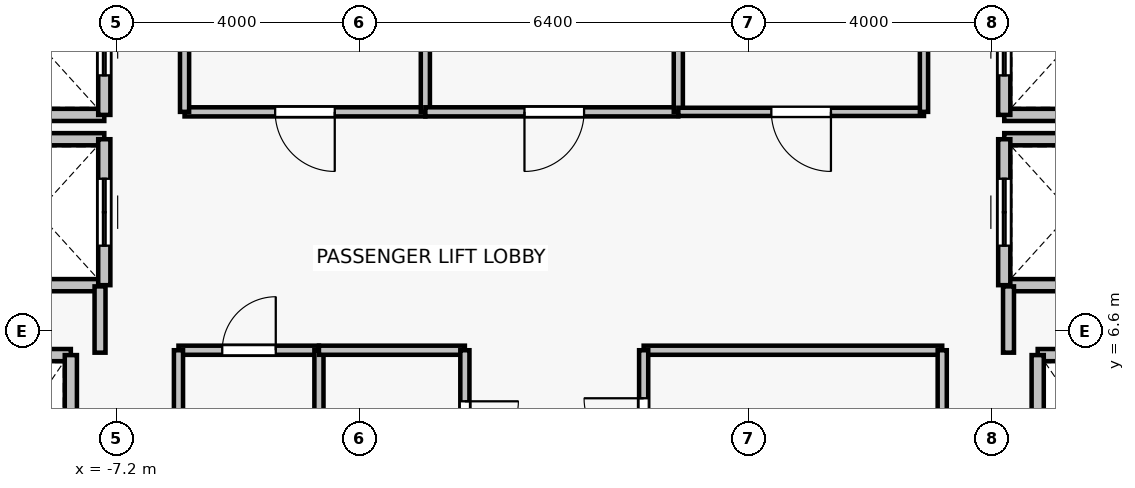
"""IFC4 building model, lengths in metres.
Left out: names, types, materials, properties, quantities, classifications, styles, units other than length and angle.
Written with IfcOpenShell. Run it as: python <this file> out.ifc"""

import sys

from ifc_helpers import new_model, si_unit, direction, frame, frame_2d, origin, place, context, subcontext, project, spatial, rectangle, extrude, source, transform, mapped, element, fill, save


model = new_model("IFC4")
c1 = context("Model", 3, precision=1e-05, world=origin(), true_north=direction((0.0, 1.0)))
c2 = subcontext(c1, "Body", "Model", "MODEL_VIEW")
j1 = project(units=[si_unit("LENGTHUNIT", "METRE"), si_unit("PLANEANGLEUNIT", "RADIAN")], contexts=[c1])
p1 = place(None, origin())
s1 = spatial("IfcSite", under=j1, at=p1, CompositionType="ELEMENT")
p2 = place(p1, origin())
s2 = spatial("IfcBuilding", under=s1, at=p2, CompositionType="ELEMENT")
p3 = place(p2, frame((0.0, 0.0, 222.1)))
s3 = spatial("IfcBuildingStorey", under=s2, at=p3, CompositionType="ELEMENT", Elevation=222.1)
p4 = place(p3, frame((-9.95, 6.2, 0.0), z_axis=(0.0, 0.0, 1.0), x_axis=(1.0, 0.0, 0.0)))
e1 = element("IfcWall", 1, at=p4, inside=s3, PredefinedType="SOLIDWALL", context=c2, shape_type="SweptSolid", body=[
    extrude(rectangle(XDim=2.0, YDim=0.2, at=frame_2d((1.0, 0.0))), origin(), (0.0, 0.0, 1.0), 3.075),
])
p5 = place(p3, frame((-7.95, 6.2, 0.0), z_axis=(0.0, 0.0, 1.0), x_axis=(0.0, -1.0, 0.0)))
e2 = element("IfcWall", 2, at=p5, inside=s3, PredefinedType="SOLIDWALL", context=c2, shape_type="SweptSolid", body=[
    extrude(rectangle(XDim=2.8, YDim=0.2, at=frame_2d((1.4, 0.0))), origin(), (0.0, 0.0, 1.0), 3.075),
])
p6 = place(p3, frame((7.95, 6.2, 0.0), z_axis=(0.0, 0.0, 1.0), x_axis=(1.0, 0.0, 0.0)))
e3 = element("IfcWall", 3, at=p6, inside=s3, PredefinedType="SOLIDWALL", context=c2, shape_type="SweptSolid", body=[
    extrude(rectangle(XDim=2.0, YDim=0.2, at=frame_2d((1.0, 0.0))), origin(), (0.0, 0.0, 1.0), 3.075),
])
p7 = place(p3, frame((7.95, 3.4, 0.0), z_axis=(0.0, 0.0, 1.0), x_axis=(0.0, 1.0, 0.0)))
e4 = element("IfcWall", 4, at=p7, inside=s3, PredefinedType="SOLIDWALL", context=c2, shape_type="SweptSolid", body=[
    extrude(rectangle(XDim=2.8, YDim=0.2, at=frame_2d((1.4, 0.0))), origin(), (0.0, 0.0, 1.0), 3.075),
])
for number, where, z_axis, x_axis in (
    (5, (-7.4, 7.35, 0.0), (0.0, 0.0, 1.0), (-1.0, 0.0, 0.0)),
    (6, (-9.6, 9.75, 0.0), (0.0, 0.0, 1.0), (1.0, 0.0, 0.0)),
):
    element("IfcWall", number, at=place(p3, frame(where, z_axis=z_axis, x_axis=x_axis)), inside=s3, PredefinedType="SOLIDWALL", context=c2, shape_type="SweptSolid", body=[
        extrude(rectangle(XDim=2.2, YDim=0.2, at=frame_2d((1.1, 0.0))), origin(), (0.0, 0.0, 1.0), 2.615),
    ])
p8 = place(p3, frame((-7.4, 9.75, 0.0), z_axis=(0.0, 0.0, 1.0), x_axis=(0.0, -1.0, 0.0)))
e7 = element("IfcWall", 7, at=p8, inside=s3, PredefinedType="SOLIDWALL", context=c2, shape_type="SweptSolid", body=[
    extrude(rectangle(XDim=2.4, YDim=0.2, at=frame_2d((1.2, 0.0))), origin(), (0.0, 0.0, 1.0), 2.615),
])
p9 = place(p8, frame((0.65, 0.0, 0.0)))
e8 = element("IfcOpeningElement", 8, at=p9, cuts=e7, PredefinedType="OPENING", context=c2, shape_type="SweptSolid", body=[
    extrude(rectangle(XDim=1.1, YDim=2.2, at=frame_2d((0.55, 1.1))), frame((0.0, 0.11, 0.0), z_axis=(0.0, -1.0, 0.0), x_axis=(1.0, 0.0, 0.0)), (0.0, 0.0, 1.0), 0.22),
])
p10 = place(p3, frame((-7.4, 10.15, 0.0), z_axis=(0.0, 0.0, 1.0), x_axis=(-1.0, 0.0, 0.0)))
e9 = element("IfcWall", 9, at=p10, inside=s3, PredefinedType="SOLIDWALL", context=c2, shape_type="SweptSolid", body=[
    extrude(rectangle(XDim=2.2, YDim=0.2, at=frame_2d((1.1, 0.0))), origin(), (0.0, 0.0, 1.0), 2.615),
])
p11 = place(p3, frame((-7.4, 12.55, 0.0), z_axis=(0.0, 0.0, 1.0), x_axis=(0.0, -1.0, 0.0)))
e10 = element("IfcWall", 10, at=p11, inside=s3, PredefinedType="SOLIDWALL", context=c2, shape_type="SweptSolid", body=[
    extrude(rectangle(XDim=2.4, YDim=0.2, at=frame_2d((1.2, 0.0))), origin(), (0.0, 0.0, 1.0), 2.615),
])
p12 = place(p11, frame((0.65, 0.0, 0.0)))
e11 = element("IfcOpeningElement", 11, at=p12, cuts=e10, PredefinedType="OPENING", context=c2, shape_type="SweptSolid", body=[
    extrude(rectangle(XDim=1.1, YDim=2.2, at=frame_2d((0.55, 1.1))), frame((0.0, 0.11, 0.0), z_axis=(0.0, -1.0, 0.0), x_axis=(1.0, 0.0, 0.0)), (0.0, 0.0, 1.0), 0.22),
])
for number, where, z_axis, x_axis in (
    (12, (9.6, 7.35, 0.0), (0.0, 0.0, 1.0), (-1.0, 0.0, 0.0)),
    (13, (7.4, 9.75, 0.0), (0.0, 0.0, 1.0), (1.0, 0.0, 0.0)),
):
    element("IfcWall", number, at=place(p3, frame(where, z_axis=z_axis, x_axis=x_axis)), inside=s3, PredefinedType="SOLIDWALL", context=c2, shape_type="SweptSolid", body=[
        extrude(rectangle(XDim=2.2, YDim=0.2, at=frame_2d((1.1, 0.0))), origin(), (0.0, 0.0, 1.0), 2.615),
    ])
p13 = place(p3, frame((7.4, 7.35, 0.0), z_axis=(0.0, 0.0, 1.0), x_axis=(0.0, 1.0, 0.0)))
e14 = element("IfcWall", 14, at=p13, inside=s3, PredefinedType="SOLIDWALL", context=c2, shape_type="SweptSolid", body=[
    extrude(rectangle(XDim=2.4, YDim=0.2, at=frame_2d((1.2, 0.0))), origin(), (0.0, 0.0, 1.0), 2.615),
])
p14 = place(p13, frame((0.65, 0.0, 0.0)))
e15 = element("IfcOpeningElement", 15, at=p14, cuts=e14, PredefinedType="OPENING", context=c2, shape_type="SweptSolid", body=[
    extrude(rectangle(XDim=1.1, YDim=2.2, at=frame_2d((0.55, 1.1))), frame((0.0, 0.11, 0.0), z_axis=(0.0, -1.0, 0.0), x_axis=(1.0, 0.0, 0.0)), (0.0, 0.0, 1.0), 0.22),
])
p15 = place(p3, frame((9.6, 10.15, 0.0), z_axis=(0.0, 0.0, 1.0), x_axis=(-1.0, 0.0, 0.0)))
e16 = element("IfcWall", 16, at=p15, inside=s3, PredefinedType="SOLIDWALL", context=c2, shape_type="SweptSolid", body=[
    extrude(rectangle(XDim=2.2, YDim=0.2, at=frame_2d((1.1, 0.0))), origin(), (0.0, 0.0, 1.0), 2.615),
])
p16 = place(p3, frame((7.4, 10.15, 0.0), z_axis=(0.0, 0.0, 1.0), x_axis=(0.0, 1.0, 0.0)))
e17 = element("IfcWall", 17, at=p16, inside=s3, PredefinedType="SOLIDWALL", context=c2, shape_type="SweptSolid", body=[
    extrude(rectangle(XDim=2.4, YDim=0.2, at=frame_2d((1.2, 0.0))), origin(), (0.0, 0.0, 1.0), 2.615),
])
p17 = place(p16, frame((0.65, 0.0, 0.0)))
e18 = element("IfcOpeningElement", 18, at=p17, cuts=e17, PredefinedType="OPENING", context=c2, shape_type="SweptSolid", body=[
    extrude(rectangle(XDim=1.1, YDim=2.2, at=frame_2d((0.55, 1.1))), frame((0.0, 0.11, 0.0), z_axis=(0.0, -1.0, 0.0), x_axis=(1.0, 0.0, 0.0)), (0.0, 0.0, 1.0), 0.22),
])
for number, where, z_axis, x_axis in (
    (19, (-7.47, 7.33, 0.0), (0.0, 0.0, 1.0), (0.0, -1.0, 0.0)),
    (20, (7.47, 6.24, 0.0), (0.0, 0.0, 1.0), (0.0, 1.0, 0.0)),
):
    element("IfcWall", number, at=place(p3, frame(where, z_axis=z_axis, x_axis=x_axis)), inside=s3, PredefinedType="PARTITIONING", context=c2, shape_type="SweptSolid", body=[
        extrude(rectangle(XDim=1.09, YDim=0.18, at=frame_2d((0.545, 0.0))), origin(), (0.0, 0.0, 1.0), 2.615),
    ])
p18 = place(p3, frame((-2.12, 10.2, 0.0), z_axis=(0.0, 0.0, 1.0), x_axis=(-1.0, 0.0, 0.0)))
e21 = element("IfcWall", 21, at=p18, inside=s3, PredefinedType="PARTITIONING", context=c2, shape_type="SweptSolid", body=[
    extrude(rectangle(XDim=3.96, YDim=0.15, at=frame_2d((1.98, 0.0))), origin(), (0.0, 0.0, 1.0), 3.075),
])
p19 = place(p18, frame((1.49, 0.0, 0.0)))
e22 = element("IfcOpeningElement", 22, at=p19, cuts=e21, PredefinedType="OPENING", context=c2, shape_type="SweptSolid", body=[
    extrude(rectangle(XDim=0.98, YDim=2.15, at=frame_2d((0.49, 1.075))), frame((0.0, 0.085, 0.0), z_axis=(0.0, -1.0, 0.0), x_axis=(1.0, 0.0, 0.0)), (0.0, 0.0, 1.0), 0.17),
])
for number, where, z_axis, x_axis in (
    (23, (-6.08, 10.2, 0.0), (0.0, 0.0, 1.0), (0.0, 1.0, 0.0)),
    (24, (-2.12, 13.0, 0.0), (0.0, 0.0, 1.0), (0.0, -1.0, 0.0)),
):
    element("IfcWall", number, at=place(p3, frame(where, z_axis=z_axis, x_axis=x_axis)), inside=s3, PredefinedType="PARTITIONING", context=c2, shape_type="SweptSolid", body=[
        extrude(rectangle(XDim=2.8, YDim=0.15, at=frame_2d((1.4, 0.0))), origin(), (0.0, 0.0, 1.0), 3.075),
    ])
p20 = place(p3, frame((2.04, 10.2, 0.0), z_axis=(0.0, 0.0, 1.0), x_axis=(-1.0, 0.0, 0.0)))
e25 = element("IfcWall", 25, at=p20, inside=s3, PredefinedType="PARTITIONING", context=c2, shape_type="SweptSolid", body=[
    extrude(rectangle(XDim=4.16, YDim=0.15, at=frame_2d((2.08, 0.0))), origin(), (0.0, 0.0, 1.0), 3.075),
])
p21 = place(p20, frame((1.55, 0.0, 0.0)))
e26 = element("IfcOpeningElement", 26, at=p21, cuts=e25, PredefinedType="OPENING", context=c2, shape_type="SweptSolid", body=[
    extrude(rectangle(XDim=0.98, YDim=2.15, at=frame_2d((0.49, 1.075))), frame((0.0, 0.085, 0.0), z_axis=(0.0, -1.0, 0.0), x_axis=(1.0, 0.0, 0.0)), (0.0, 0.0, 1.0), 0.17),
])
p22 = place(p3, frame((2.04, 13.0, 0.0), z_axis=(0.0, 0.0, 1.0), x_axis=(0.0, -1.0, 0.0)))
e27 = element("IfcWall", 27, at=p22, inside=s3, PredefinedType="PARTITIONING", context=c2, shape_type="SweptSolid", body=[
    extrude(rectangle(XDim=2.8, YDim=0.15, at=frame_2d((1.4, 0.0))), origin(), (0.0, 0.0, 1.0), 3.075),
])
p23 = place(p3, frame((6.08, 10.2, 0.0), z_axis=(0.0, 0.0, 1.0), x_axis=(-1.0, 0.0, 0.0)))
e28 = element("IfcWall", 28, at=p23, inside=s3, PredefinedType="PARTITIONING", context=c2, shape_type="SweptSolid", body=[
    extrude(rectangle(XDim=4.04, YDim=0.135, at=frame_2d((2.02, 0.0))), origin(), (0.0, 0.0, 1.0), 3.075),
])
p24 = place(p23, frame((1.53, 0.0, 0.0)))
e29 = element("IfcOpeningElement", 29, at=p24, cuts=e28, PredefinedType="OPENING", context=c2, shape_type="SweptSolid", body=[
    extrude(rectangle(XDim=0.98, YDim=2.15, at=frame_2d((0.49, 1.075))), frame((0.0, 0.077, 0.0), z_axis=(0.0, -1.0, 0.0), x_axis=(1.0, 0.0, 0.0)), (0.0, 0.0, 1.0), 0.155),
])
p25 = place(p3, frame((6.08, 13.0, 0.0), z_axis=(0.0, 0.0, 1.0), x_axis=(0.0, -1.0, 0.0)))
e30 = element("IfcWall", 30, at=p25, inside=s3, PredefinedType="PARTITIONING", context=c2, shape_type="SweptSolid", body=[
    extrude(rectangle(XDim=2.8, YDim=0.135, at=frame_2d((1.4, 0.0))), origin(), (0.0, 0.0, 1.0), 3.075),
])
p26 = place(p3, frame((-6.18, 6.28, 0.0), z_axis=(0.0, 0.0, 1.0), x_axis=(1.0, 0.0, 0.0)))
e31 = element("IfcWall", 31, at=p26, inside=s3, PredefinedType="PARTITIONING", context=c2, shape_type="SweptSolid", body=[
    extrude(rectangle(XDim=2.31, YDim=0.15, at=frame_2d((1.155, 0.0))), origin(), (0.0, 0.0, 1.0), 3.075),
])
p27 = place(p26, frame((0.72, 0.0, 0.0)))
e32 = element("IfcOpeningElement", 32, at=p27, cuts=e31, PredefinedType="OPENING", context=c2, shape_type="SweptSolid", body=[
    extrude(rectangle(XDim=0.88, YDim=2.1, at=frame_2d((0.44, 1.05))), frame((0.0, 0.085, 0.0), z_axis=(0.0, -1.0, 0.0), x_axis=(1.0, 0.0, 0.0)), (0.0, 0.0, 1.0), 0.17),
])
for number, where, z_axis, x_axis in (
    (33, (-6.18, 3.76, 0.0), (0.0, 0.0, 1.0), (0.0, 1.0, 0.0)),
    (34, (-3.87, 6.28, 0.0), (0.0, 0.0, 1.0), (0.0, -1.0, 0.0)),
):
    element("IfcWall", number, at=place(p3, frame(where, z_axis=z_axis, x_axis=x_axis)), inside=s3, PredefinedType="PARTITIONING", context=c2, shape_type="SweptSolid", body=[
        extrude(rectangle(XDim=2.52, YDim=0.15, at=frame_2d((1.26, 0.0))), origin(), (0.0, 0.0, 1.0), 3.075),
    ])
p28 = place(p3, frame((-3.87, 6.28, 0.0), z_axis=(0.0, 0.0, 1.0), x_axis=(1.0, 0.0, 0.0)))
e35 = element("IfcWall", 35, at=p28, inside=s3, PredefinedType="PARTITIONING", context=c2, shape_type="SweptSolid", body=[
    extrude(rectangle(XDim=2.4, YDim=0.15, at=frame_2d((1.2, 0.0))), origin(), (0.0, 0.0, 1.0), 3.075),
])
p29 = place(p3, frame((-1.47, 6.28, 0.0), z_axis=(0.0, 0.0, 1.0), x_axis=(0.0, -1.0, 0.0)))
e36 = element("IfcWall", 36, at=p29, inside=s3, PredefinedType="PARTITIONING", context=c2, shape_type="SweptSolid", body=[
    extrude(rectangle(XDim=2.52, YDim=0.15, at=frame_2d((1.26, 0.0))), origin(), (0.0, 0.0, 1.0), 3.075),
])
p30 = place(p29, frame((0.84, 0.0, 0.0)))
e37 = element("IfcOpeningElement", 37, at=p30, cuts=e36, PredefinedType="OPENING", context=c2, shape_type="SweptSolid", body=[
    extrude(rectangle(XDim=0.88, YDim=2.1, at=frame_2d((0.44, 1.05))), frame((0.0, 0.085, 0.0), z_axis=(0.0, -1.0, 0.0), x_axis=(1.0, 0.0, 0.0)), (0.0, 0.0, 1.0), 0.17),
])
p31 = place(p3, frame((1.47, 6.28, 0.0), z_axis=(0.0, 0.0, 1.0), x_axis=(1.0, 0.0, 0.0)))
e38 = element("IfcWall", 38, at=p31, inside=s3, PredefinedType="PARTITIONING", context=c2, shape_type="SweptSolid", body=[
    extrude(rectangle(XDim=4.91, YDim=0.15, at=frame_2d((2.455, 0.0))), origin(), (0.0, 0.0, 1.0), 3.075),
])
p32 = place(p3, frame((1.47, 3.76, 0.0), z_axis=(0.0, 0.0, 1.0), x_axis=(0.0, 1.0, 0.0)))
e39 = element("IfcWall", 39, at=p32, inside=s3, PredefinedType="PARTITIONING", context=c2, shape_type="SweptSolid", body=[
    extrude(rectangle(XDim=2.52, YDim=0.15, at=frame_2d((1.26, 0.0))), origin(), (0.0, 0.0, 1.0), 3.075),
])
p33 = place(p32, frame((0.75, 0.0, 0.0)))
e40 = element("IfcOpeningElement", 40, at=p33, cuts=e39, PredefinedType="OPENING", context=c2, shape_type="SweptSolid", body=[
    extrude(rectangle(XDim=0.98, YDim=2.15, at=frame_2d((0.49, 1.075))), frame((0.0, 0.085, 0.0), z_axis=(0.0, -1.0, 0.0), x_axis=(1.0, 0.0, 0.0)), (0.0, 0.0, 1.0), 0.17),
])
p34 = place(p3, frame((6.38, 6.28, 0.0), z_axis=(0.0, 0.0, 1.0), x_axis=(0.0, -1.0, 0.0)))
e41 = element("IfcWall", 41, at=p34, inside=s3, PredefinedType="PARTITIONING", context=c2, shape_type="SweptSolid", body=[
    extrude(rectangle(XDim=2.52, YDim=0.15, at=frame_2d((1.26, 0.0))), origin(), (0.0, 0.0, 1.0), 3.075),
])
m1 = source(origin(), c2, "Body", "SweptSolid", [
    extrude(rectangle(XDim=1.1, YDim=2.2, at=frame_2d((0.55, 1.1))), frame((0.0, 0.025, 0.0), z_axis=(0.0, -1.0, 0.0), x_axis=(1.0, 0.0, 0.0)), (0.0, 0.0, 1.0), 0.05),
])
p35 = place(p9, origin())
e42 = element("IfcDoor", 42, at=p35, inside=s3, OperationType="DOUBLE_DOOR_SLIDING", PredefinedType="DOOR", context=c2, shape_type="MappedRepresentation", body=[
    mapped(m1, transform((0.0, 0.0, 0.0), x_axis=(1.0, 0.0, 0.0), y_axis=(0.0, 1.0, 0.0), z_axis=(0.0, 0.0, 1.0), scale=1.0)),
])
fill(e8, e42)
p36 = place(p12, origin())
e43 = element("IfcDoor", 43, at=p36, inside=s3, OperationType="DOUBLE_DOOR_SLIDING", PredefinedType="DOOR", context=c2, shape_type="MappedRepresentation", body=[
    mapped(m1, transform((0.0, 0.0, 0.0), x_axis=(1.0, 0.0, 0.0), y_axis=(0.0, 1.0, 0.0), z_axis=(0.0, 0.0, 1.0), scale=1.0)),
])
fill(e11, e43)
p37 = place(p14, origin())
e44 = element("IfcDoor", 44, at=p37, inside=s3, OperationType="DOUBLE_DOOR_SLIDING", PredefinedType="DOOR", context=c2, shape_type="MappedRepresentation", body=[
    mapped(m1, transform((0.0, 0.0, 0.0), x_axis=(1.0, 0.0, 0.0), y_axis=(0.0, 1.0, 0.0), z_axis=(0.0, 0.0, 1.0), scale=1.0)),
])
fill(e15, e44)
p38 = place(p17, origin())
e45 = element("IfcDoor", 45, at=p38, inside=s3, OperationType="DOUBLE_DOOR_SLIDING", PredefinedType="DOOR", context=c2, shape_type="MappedRepresentation", body=[
    mapped(m1, transform((0.0, 0.0, 0.0), x_axis=(1.0, 0.0, 0.0), y_axis=(0.0, 1.0, 0.0), z_axis=(0.0, 0.0, 1.0), scale=1.0)),
])
fill(e18, e45)
m2 = source(origin(), c2, "Body", "SweptSolid", [
    extrude(rectangle(XDim=0.98, YDim=2.15, at=frame_2d((0.49, 1.075))), frame((0.0, 0.025, 0.0), z_axis=(0.0, -1.0, 0.0), x_axis=(1.0, 0.0, 0.0)), (0.0, 0.0, 1.0), 0.05),
])
p39 = place(p19, origin())
e46 = element("IfcDoor", 46, at=p39, inside=s3, OperationType="SINGLE_SWING_LEFT", PredefinedType="DOOR", context=c2, shape_type="MappedRepresentation", body=[
    mapped(m2, transform((0.0, 0.0, 0.0), x_axis=(1.0, 0.0, 0.0), y_axis=(0.0, 1.0, 0.0), z_axis=(0.0, 0.0, 1.0), scale=1.0)),
])
fill(e22, e46)
p40 = place(p21, origin())
e47 = element("IfcDoor", 47, at=p40, inside=s3, OperationType="SINGLE_SWING_RIGHT", PredefinedType="DOOR", context=c2, shape_type="MappedRepresentation", body=[
    mapped(m2, transform((0.0, 0.0, 0.0), x_axis=(1.0, 0.0, 0.0), y_axis=(0.0, 1.0, 0.0), z_axis=(0.0, 0.0, 1.0), scale=1.0)),
])
fill(e26, e47)
p41 = place(p24, origin())
e48 = element("IfcDoor", 48, at=p41, inside=s3, OperationType="SINGLE_SWING_LEFT", PredefinedType="DOOR", context=c2, shape_type="MappedRepresentation", body=[
    mapped(m2, transform((0.0, 0.0, 0.0), x_axis=(1.0, 0.0, 0.0), y_axis=(0.0, 1.0, 0.0), z_axis=(0.0, 0.0, 1.0), scale=1.0)),
])
fill(e29, e48)
m3 = source(origin(), c2, "Body", "SweptSolid", [
    extrude(rectangle(XDim=0.88, YDim=2.1, at=frame_2d((0.44, 1.05))), frame((0.0, 0.025, 0.0), z_axis=(0.0, -1.0, 0.0), x_axis=(1.0, 0.0, 0.0)), (0.0, 0.0, 1.0), 0.05),
])
p42 = place(p27, origin())
e49 = element("IfcDoor", 49, at=p42, inside=s3, OperationType="SINGLE_SWING_RIGHT", PredefinedType="DOOR", context=c2, shape_type="MappedRepresentation", body=[
    mapped(m3, transform((0.0, 0.0, 0.0), x_axis=(1.0, 0.0, 0.0), y_axis=(0.0, 1.0, 0.0), z_axis=(0.0, 0.0, 1.0), scale=1.0)),
])
fill(e32, e49)
p43 = place(p30, origin())
e50 = element("IfcDoor", 50, at=p43, inside=s3, OperationType="SINGLE_SWING_LEFT", PredefinedType="DOOR", context=c2, shape_type="MappedRepresentation", body=[
    mapped(m3, transform((0.0, 0.0, 0.0), x_axis=(1.0, 0.0, 0.0), y_axis=(0.0, 1.0, 0.0), z_axis=(0.0, 0.0, 1.0), scale=1.0)),
])
fill(e37, e50)
p44 = place(p33, origin())
e51 = element("IfcDoor", 51, at=p44, inside=s3, OperationType="SINGLE_SWING_RIGHT", PredefinedType="DOOR", context=c2, shape_type="MappedRepresentation", body=[
    mapped(m2, transform((0.0, 0.0, 0.0), x_axis=(1.0, 0.0, 0.0), y_axis=(0.0, 1.0, 0.0), z_axis=(0.0, 0.0, 1.0), scale=1.0)),
])
fill(e40, e51)
save(model, sys.argv[1])
